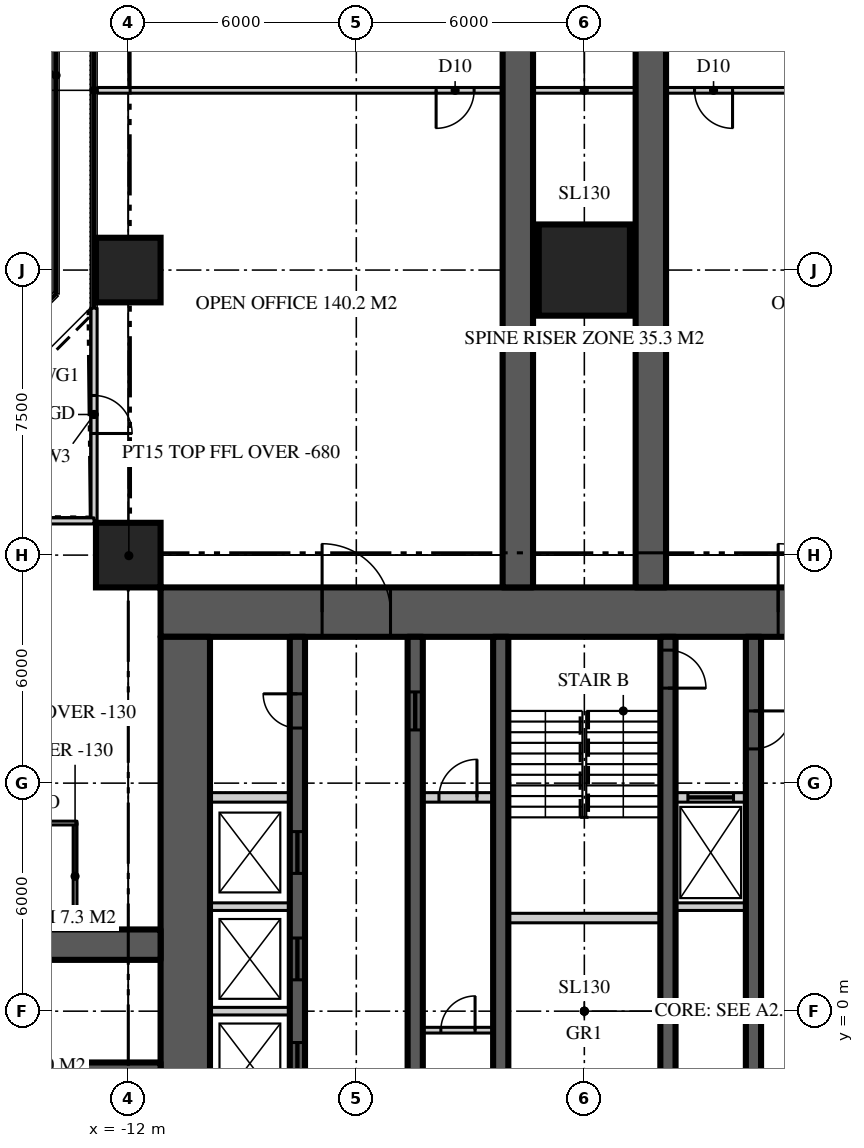
"""IFC4 building model, lengths in metres.
Left out: names, types, materials, properties, quantities, classifications, styles, units other than length and angle.
Written with IfcOpenShell. Run it as: python <this file> out.ifc"""

import sys

from ifc_helpers import new_model, si_unit, direction, frame, frame_2d, origin, origin_2d, place, context, subcontext, project, spatial, rectangle, extrude, element, fill, save


model = new_model("IFC4")
c1 = context("Model", 3, precision=1e-05, world=origin(), true_north=direction((0.0, 1.0)))
c2 = subcontext(c1, "Body", "Model", "MODEL_VIEW")
j1 = project(units=[si_unit("LENGTHUNIT", "METRE"), si_unit("PLANEANGLEUNIT", "RADIAN")], contexts=[c1])
p1 = place(None, origin())
s1 = spatial("IfcSite", under=j1, at=p1, CompositionType="ELEMENT")
p2 = place(p1, origin())
s2 = spatial("IfcBuilding", under=s1, at=p2, CompositionType="ELEMENT")
p3 = place(p2, frame((0.0, 0.0, 98.1)))
s3 = spatial("IfcBuildingStorey", under=s2, at=p3, CompositionType="ELEMENT", Elevation=98.1)
p4 = place(p3, frame((-11.15, 10.5, 0.0), z_axis=(0.0, 0.0, 1.0), x_axis=(1.0, 0.0, 0.0)))
e1 = element("IfcWall", 1, at=p4, inside=s3, PredefinedType="SHEAR", context=c2, shape_type="SweptSolid", body=[
    extrude(rectangle(XDim=22.3, YDim=1.3, at=frame_2d((11.15, 0.0))), origin(), (0.0, 0.0, 1.0), 3.9),
])
p5 = place(p4, frame((4.25, 0.0, 0.0)))
e2 = element("IfcOpeningElement", 2, at=p5, cuts=e1, PredefinedType="OPENING", context=c2, shape_type="SweptSolid", body=[
    extrude(rectangle(XDim=1.8, YDim=2.2, at=frame_2d((0.9, 1.1))), frame((0.0, 0.66, 0.0), z_axis=(0.0, -1.0, 0.0), x_axis=(1.0, 0.0, 0.0)), (0.0, 0.0, 1.0), 1.32),
])
p6 = place(p4, frame((16.25, 0.0, 0.0)))
e3 = element("IfcOpeningElement", 3, at=p6, cuts=e1, PredefinedType="OPENING", context=c2, shape_type="SweptSolid", body=[
    extrude(rectangle(XDim=1.8, YDim=2.2, at=frame_2d((0.9, 1.1))), frame((0.0, 0.66, 0.0), z_axis=(0.0, -1.0, 0.0), x_axis=(1.0, 0.0, 0.0)), (0.0, 0.0, 1.0), 1.32),
])
p7 = place(p3, frame((-10.5, 9.85, 0.0), z_axis=(0.0, 0.0, 1.0), x_axis=(0.0, -1.0, 0.0)))
e4 = element("IfcWall", 4, at=p7, inside=s3, PredefinedType="SHEAR", context=c2, shape_type="SweptSolid", body=[
    extrude(rectangle(XDim=19.7, YDim=1.3, at=frame_2d((9.85, 0.0))), origin(), (0.0, 0.0, 1.0), 3.9),
])
p8 = place(p7, frame((17.25, 0.0, 0.0)))
e5 = element("IfcOpeningElement", 5, at=p8, cuts=e4, PredefinedType="OPENING", context=c2, shape_type="SweptSolid", body=[
    extrude(rectangle(XDim=1.0, YDim=2.2, at=frame_2d((0.5, 1.1))), frame((0.0, 0.66, 0.0), z_axis=(0.0, -1.0, 0.0), x_axis=(1.0, 0.0, 0.0)), (0.0, 0.0, 1.0), 1.32),
])
for number, where, z_axis, x_axis in (
    (6, (1.75, 11.15, 0.0), (0.0, 0.0, 1.0), (0.0, 1.0, 0.0)),
    (7, (-1.75, 11.15, 0.0), (0.0, 0.0, 1.0), (0.0, 1.0, 0.0)),
    (8, (-11.15, 1.75, 0.0), (0.0, 0.0, 1.0), (-1.0, 0.0, 0.0)),
    (9, (-11.15, -1.75, 0.0), (0.0, 0.0, 1.0), (-1.0, 0.0, 0.0)),
):
    element("IfcWall", number, at=place(p3, frame(where, z_axis=z_axis, x_axis=x_axis)), inside=s3, PredefinedType="SHEAR", context=c2, shape_type="SweptSolid", body=[
        extrude(rectangle(XDim=15.25, YDim=0.8, at=frame_2d((7.625, 0.0))), origin(), (0.0, 0.0, 1.0), 3.9),
    ])
for number, where, z_axis, x_axis in (
    (10, (-12.0, 12.0, 0.0), (0.0, 0.0, 1.0), (1.0, 0.0, 0.0)),
    (11, (-12.0, 19.5, 0.0), (0.0, 0.0, 1.0), (1.0, 0.0, 0.0)),
):
    element("IfcColumn", number, at=place(p3, frame(where, z_axis=z_axis, x_axis=x_axis)), inside=s3, PredefinedType="COLUMN", context=c2, shape_type="SweptSolid", body=[
        extrude(rectangle(XDim=1.7, YDim=1.7, at=origin_2d()), origin(), (0.0, 0.0, 1.0), 3.9),
    ])
p9 = place(p3, frame((0.0, 19.5, 0.0), z_axis=(0.0, 0.0, 1.0), x_axis=(1.0, 0.0, 0.0)))
e12 = element("IfcColumn", 12, at=p9, inside=s3, PredefinedType="COLUMN", context=c2, shape_type="SweptSolid", body=[
    extrude(rectangle(XDim=2.4, YDim=2.4, at=origin_2d()), origin(), (0.0, 0.0, 1.0), 3.9),
])
p10 = place(p3, frame((-12.9, 18.5, 0.0), z_axis=(0.0, 0.0, 1.0), x_axis=(0.0, -1.0, 0.0)))
e13 = element("IfcWall", 13, at=p10, inside=s3, PredefinedType="SOLIDWALL", context=c2, shape_type="SweptSolid", body=[
    extrude(rectangle(XDim=5.6, YDim=0.16, at=frame_2d((2.8, 0.0))), origin(), (0.0, 0.0, 1.0), 3.77),
])
p11 = place(p10, frame((2.3, 0.0, 0.0)))
e14 = element("IfcOpeningElement", 14, at=p11, cuts=e13, PredefinedType="OPENING", context=c2, shape_type="SweptSolid", body=[
    extrude(rectangle(XDim=1.0, YDim=2.2, at=frame_2d((0.5, 1.1))), frame((0.0, 0.09, 0.0), z_axis=(0.0, -1.0, 0.0), x_axis=(1.0, 0.0, 0.0)), (0.0, 0.0, 1.0), 0.18),
])
p12 = place(p3, frame((-12.9, 12.9, 0.0), z_axis=(0.0, 0.0, 1.0), x_axis=(-1.0, 0.0, 0.0)))
e15 = element("IfcWall", 15, at=p12, inside=s3, PredefinedType="SOLIDWALL", context=c2, shape_type="SweptSolid", body=[
    extrude(rectangle(XDim=5.6, YDim=0.16, at=frame_2d((2.8, 0.0))), origin(), (0.0, 0.0, 1.0), 3.77),
])
p13 = place(p3, frame((-7.55, -9.85, 0.0), z_axis=(0.0, 0.0, 1.0), x_axis=(0.0, 1.0, 0.0)))
e16 = element("IfcWall", 16, at=p13, inside=s3, PredefinedType="SHEAR", context=c2, shape_type="SweptSolid", body=[
    extrude(rectangle(XDim=19.7, YDim=0.4, at=frame_2d((9.85, 0.0))), origin(), (0.0, 0.0, 1.0), 3.9),
])
p14 = place(p13, frame((1.45, 0.0, 0.0)))
e17 = element("IfcOpeningElement", 17, at=p14, cuts=e16, PredefinedType="OPENING", context=c2, shape_type="SweptSolid", body=[
    extrude(rectangle(XDim=1.0, YDim=2.2, at=frame_2d((0.5, 1.1))), frame((0.0, 0.21, 0.0), z_axis=(0.0, -1.0, 0.0), x_axis=(1.0, 0.0, 0.0)), (0.0, 0.0, 1.0), 0.42),
])
p15 = place(p13, frame((17.3, 0.0, 0.0)))
e18 = element("IfcOpeningElement", 18, at=p15, cuts=e16, PredefinedType="OPENING", context=c2, shape_type="SweptSolid", body=[
    extrude(rectangle(XDim=0.9, YDim=2.1, at=frame_2d((0.45, 1.05))), frame((0.0, 0.21, 0.0), z_axis=(0.0, -1.0, 0.0), x_axis=(1.0, 0.0, 0.0)), (0.0, 0.0, 1.0), 0.42),
])
p16 = place(p13, frame((5.125, 0.0, 0.0)))
e19 = element("IfcOpeningElement", 19, at=p16, cuts=e16, PredefinedType="OPENING", context=c2, shape_type="SweptSolid", body=[
    extrude(rectangle(XDim=1.1, YDim=2.2, at=frame_2d((0.55, 1.1))), frame((0.0, 0.21, 0.0), z_axis=(0.0, -1.0, 0.0), x_axis=(1.0, 0.0, 0.0)), (0.0, 0.0, 1.0), 0.42),
])
p17 = place(p13, frame((7.925, 0.0, 0.0)))
e20 = element("IfcOpeningElement", 20, at=p17, cuts=e16, PredefinedType="OPENING", context=c2, shape_type="SweptSolid", body=[
    extrude(rectangle(XDim=1.1, YDim=2.2, at=frame_2d((0.55, 1.1))), frame((0.0, 0.21, 0.0), z_axis=(0.0, -1.0, 0.0), x_axis=(1.0, 0.0, 0.0)), (0.0, 0.0, 1.0), 0.42),
])
p18 = place(p13, frame((10.675, 0.0, 0.0)))
e21 = element("IfcOpeningElement", 21, at=p18, cuts=e16, PredefinedType="OPENING", context=c2, shape_type="SweptSolid", body=[
    extrude(rectangle(XDim=1.1, YDim=2.2, at=frame_2d((0.55, 1.1))), frame((0.0, 0.21, 0.0), z_axis=(0.0, -1.0, 0.0), x_axis=(1.0, 0.0, 0.0)), (0.0, 0.0, 1.0), 0.42),
])
p19 = place(p13, frame((13.475, 0.0, 0.0)))
e22 = element("IfcOpeningElement", 22, at=p19, cuts=e16, PredefinedType="OPENING", context=c2, shape_type="SweptSolid", body=[
    extrude(rectangle(XDim=1.1, YDim=2.2, at=frame_2d((0.55, 1.1))), frame((0.0, 0.21, 0.0), z_axis=(0.0, -1.0, 0.0), x_axis=(1.0, 0.0, 0.0)), (0.0, 0.0, 1.0), 0.42),
])
p20 = place(p3, frame((-4.45, -9.85, 0.0), z_axis=(0.0, 0.0, 1.0), x_axis=(0.0, 1.0, 0.0)))
e23 = element("IfcWall", 23, at=p20, inside=s3, PredefinedType="SHEAR", context=c2, shape_type="SweptSolid", body=[
    extrude(rectangle(XDim=19.7, YDim=0.4, at=frame_2d((9.85, 0.0))), origin(), (0.0, 0.0, 1.0), 3.9),
])
p21 = place(p20, frame((1.95, 0.0, 0.0)))
e24 = element("IfcOpeningElement", 24, at=p21, cuts=e23, PredefinedType="OPENING", context=c2, shape_type="SweptSolid", body=[
    extrude(rectangle(XDim=1.0, YDim=2.2, at=frame_2d((0.5, 1.1))), frame((0.0, 0.21, 0.0), z_axis=(0.0, -1.0, 0.0), x_axis=(1.0, 0.0, 0.0)), (0.0, 0.0, 1.0), 0.42),
])
p22 = place(p20, frame((17.25, 0.0, 0.0)))
e25 = element("IfcOpeningElement", 25, at=p22, cuts=e23, PredefinedType="OPENING", context=c2, shape_type="SweptSolid", body=[
    extrude(rectangle(XDim=1.0, YDim=2.1, at=frame_2d((0.5, 1.05))), frame((0.0, 0.21, 0.0), z_axis=(0.0, -1.0, 0.0), x_axis=(1.0, 0.0, 0.0)), (0.0, 0.0, 1.0), 0.42),
])
p23 = place(p3, frame((4.45, 9.85, 0.0), z_axis=(0.0, 0.0, 1.0), x_axis=(0.0, -1.0, 0.0)))
e26 = element("IfcWall", 26, at=p23, inside=s3, PredefinedType="SHEAR", context=c2, shape_type="SweptSolid", body=[
    extrude(rectangle(XDim=19.7, YDim=0.4, at=frame_2d((9.85, 0.0))), origin(), (0.0, 0.0, 1.0), 3.9),
])
p24 = place(p23, frame((1.95, 0.0, 0.0)))
e27 = element("IfcOpeningElement", 27, at=p24, cuts=e26, PredefinedType="OPENING", context=c2, shape_type="SweptSolid", body=[
    extrude(rectangle(XDim=1.0, YDim=2.2, at=frame_2d((0.5, 1.1))), frame((0.0, 0.21, 0.0), z_axis=(0.0, -1.0, 0.0), x_axis=(1.0, 0.0, 0.0)), (0.0, 0.0, 1.0), 0.42),
])
p25 = place(p23, frame((17.3, 0.0, 0.0)))
e28 = element("IfcOpeningElement", 28, at=p25, cuts=e26, PredefinedType="OPENING", context=c2, shape_type="SweptSolid", body=[
    extrude(rectangle(XDim=0.9, YDim=2.1, at=frame_2d((0.45, 1.05))), frame((0.0, 0.21, 0.0), z_axis=(0.0, -1.0, 0.0), x_axis=(1.0, 0.0, 0.0)), (0.0, 0.0, 1.0), 0.42),
])
p26 = place(p3, frame((-2.2, -9.85, 0.0), z_axis=(0.0, 0.0, 1.0), x_axis=(0.0, 1.0, 0.0)))
e29 = element("IfcWall", 29, at=p26, inside=s3, PredefinedType="SHEAR", context=c2, shape_type="SweptSolid", body=[
    extrude(rectangle(XDim=19.7, YDim=0.4, at=frame_2d((9.85, 0.0))), origin(), (0.0, 0.0, 1.0), 3.9),
])
p27 = place(p26, frame((0.35, 0.0, 0.0)))
e30 = element("IfcOpeningElement", 30, at=p27, cuts=e29, PredefinedType="OPENING", context=c2, shape_type="SweptSolid", body=[
    extrude(rectangle(XDim=1.0, YDim=2.2, at=frame_2d((0.5, 1.1))), frame((0.0, 0.21, 0.0), z_axis=(0.0, -1.0, 0.0), x_axis=(1.0, 0.0, 0.0)), (0.0, 0.0, 1.0), 0.42),
])
p28 = place(p3, frame((2.2, 9.85, 0.0), z_axis=(0.0, 0.0, 1.0), x_axis=(0.0, -1.0, 0.0)))
e31 = element("IfcWall", 31, at=p28, inside=s3, PredefinedType="SHEAR", context=c2, shape_type="SweptSolid", body=[
    extrude(rectangle(XDim=19.7, YDim=0.4, at=frame_2d((9.85, 0.0))), origin(), (0.0, 0.0, 1.0), 3.9),
])
p29 = place(p28, frame((0.35, 0.0, 0.0)))
e32 = element("IfcOpeningElement", 32, at=p29, cuts=e31, PredefinedType="OPENING", context=c2, shape_type="SweptSolid", body=[
    extrude(rectangle(XDim=1.0, YDim=2.2, at=frame_2d((0.5, 1.1))), frame((0.0, 0.21, 0.0), z_axis=(0.0, -1.0, 0.0), x_axis=(1.0, 0.0, 0.0)), (0.0, 0.0, 1.0), 0.42),
])
p30 = place(p3, frame((-9.85, 5.625, 0.0), z_axis=(0.0, 0.0, 1.0), x_axis=(1.0, 0.0, 0.0)))
e33 = element("IfcWall", 33, at=p30, inside=s3, PredefinedType="SOLIDWALL", context=c2, shape_type="SweptSolid", body=[
    extrude(rectangle(XDim=2.1, YDim=0.25, at=frame_2d((1.05, 0.0))), origin(), (0.0, 0.0, 1.0), 3.7),
])
p31 = place(p3, frame((-4.25, 5.625, 0.0), z_axis=(0.0, 0.0, 1.0), x_axis=(1.0, 0.0, 0.0)))
e34 = element("IfcWall", 34, at=p31, inside=s3, PredefinedType="SOLIDWALL", context=c2, shape_type="SweptSolid", body=[
    extrude(rectangle(XDim=1.85, YDim=0.25, at=frame_2d((0.925, 0.0))), origin(), (0.0, 0.0, 1.0), 3.7),
])
p32 = place(p31, frame((0.425, 0.0, 0.0)))
e35 = element("IfcOpeningElement", 35, at=p32, cuts=e34, PredefinedType="OPENING", context=c2, shape_type="SweptSolid", body=[
    extrude(rectangle(XDim=1.0, YDim=2.2, at=frame_2d((0.5, 1.1))), frame((0.0, 0.135, 0.0), z_axis=(0.0, -1.0, 0.0), x_axis=(1.0, 0.0, 0.0)), (0.0, 0.0, 1.0), 0.27),
])
p33 = place(p3, frame((2.4, 5.625, 0.0), z_axis=(0.0, 0.0, 1.0), x_axis=(1.0, 0.0, 0.0)))
e36 = element("IfcWall", 36, at=p33, inside=s3, PredefinedType="SOLIDWALL", context=c2, shape_type="SweptSolid", body=[
    extrude(rectangle(XDim=1.85, YDim=0.25, at=frame_2d((0.925, 0.0))), origin(), (0.0, 0.0, 1.0), 3.7),
])
p34 = place(p33, frame((0.325, 0.0, 0.0)))
e37 = element("IfcOpeningElement", 37, at=p34, cuts=e36, PredefinedType="OPENING", context=c2, shape_type="SweptSolid", body=[
    extrude(rectangle(XDim=1.2, YDim=2.2, at=frame_2d((0.6, 1.1))), frame((0.0, 0.135, 0.0), z_axis=(0.0, -1.0, 0.0), x_axis=(1.0, 0.0, 0.0)), (0.0, 0.0, 1.0), 0.27),
])
p35 = place(p3, frame((-2.0, 2.45, 0.0), z_axis=(0.0, 0.0, 1.0), x_axis=(1.0, 0.0, 0.0)))
e38 = element("IfcWall", 38, at=p35, inside=s3, PredefinedType="SOLIDWALL", context=c2, shape_type="SweptSolid", body=[
    extrude(rectangle(XDim=4.0, YDim=0.25, at=frame_2d((2.0, 0.0))), origin(), (0.0, 0.0, 1.0), 3.7),
])
for number, where, z_axis, x_axis in (
    (39, (-9.85, 0.0, 0.0), (0.0, 0.0, 1.0), (1.0, 0.0, 0.0)),
    (40, (-9.85, 2.75, 0.0), (0.0, 0.0, 1.0), (1.0, 0.0, 0.0)),
):
    element("IfcWall", number, at=place(p3, frame(where, z_axis=z_axis, x_axis=x_axis)), inside=s3, PredefinedType="SOLIDWALL", context=c2, shape_type="SweptSolid", body=[
        extrude(rectangle(XDim=2.1, YDim=0.2, at=frame_2d((1.05, 0.0))), origin(), (0.0, 0.0, 1.0), 3.7),
    ])
p36 = place(p3, frame((2.4, 2.75, 0.0), z_axis=(0.0, 0.0, 1.0), x_axis=(1.0, 0.0, 0.0)))
e41 = element("IfcWall", 41, at=p36, inside=s3, PredefinedType="SOLIDWALL", context=c2, shape_type="SweptSolid", body=[
    extrude(rectangle(XDim=1.85, YDim=0.2, at=frame_2d((0.925, 0.0))), origin(), (0.0, 0.0, 1.0), 3.7),
])
p37 = place(p3, frame((12.82, 24.229, 0.0), z_axis=(0.0, 0.0, 1.0), x_axis=(-1.0, 0.0, 0.0)))
e42 = element("IfcWall", 42, at=p37, inside=s3, PredefinedType="PARTITIONING", context=c2, shape_type="SweptSolid", body=[
    extrude(rectangle(XDim=25.64, YDim=0.15, at=frame_2d((12.82, 0.0))), origin(), (0.0, 0.0, 1.0), 3.77),
])
p38 = place(p37, frame((15.72, 0.0, 0.0)))
e43 = element("IfcOpeningElement", 43, at=p38, cuts=e42, PredefinedType="OPENING", context=c2, shape_type="SweptSolid", body=[
    extrude(rectangle(XDim=1.0, YDim=2.2, at=frame_2d((0.5, 1.1))), frame((0.0, 0.085, 0.0), z_axis=(0.0, -1.0, 0.0), x_axis=(1.0, 0.0, 0.0)), (0.0, 0.0, 1.0), 0.17),
])
p39 = place(p37, frame((8.92, 0.0, 0.0)))
e44 = element("IfcOpeningElement", 44, at=p39, cuts=e42, PredefinedType="OPENING", context=c2, shape_type="SweptSolid", body=[
    extrude(rectangle(XDim=1.0, YDim=2.2, at=frame_2d((0.5, 1.1))), frame((0.0, 0.085, 0.0), z_axis=(0.0, -1.0, 0.0), x_axis=(1.0, 0.0, 0.0)), (0.0, 0.0, 1.0), 0.17),
])
p40 = place(p3, frame((-13.4, 2.15, 0.0), z_axis=(0.0, 0.0, 1.0), x_axis=(0.0, 1.0, 0.0)))
e45 = element("IfcWall", 45, at=p40, inside=s3, PredefinedType="PARTITIONING", context=c2, shape_type="SweptSolid", body=[
    extrude(rectangle(XDim=2.8, YDim=0.1, at=frame_2d((1.4, 0.0))), origin(), (0.0, 0.0, 1.0), 3.77),
])
p41 = place(p3, frame((-13.35, 4.95, 0.0), z_axis=(0.0, 0.0, 1.0), x_axis=(-1.0, 0.0, 0.0)))
e46 = element("IfcWall", 46, at=p41, inside=s3, PredefinedType="PARTITIONING", context=c2, shape_type="SweptSolid", body=[
    extrude(rectangle(XDim=2.7, YDim=0.1, at=frame_2d((1.35, 0.0))), origin(), (0.0, 0.0, 1.0), 3.77),
])
p42 = place(p41, frame((0.85, 0.0, 0.0)))
e47 = element("IfcOpeningElement", 47, at=p42, cuts=e46, PredefinedType="OPENING", context=c2, shape_type="SweptSolid", body=[
    extrude(rectangle(XDim=1.0, YDim=2.2, at=frame_2d((0.5, 1.1))), frame((0.0, 0.06, 0.0), z_axis=(0.0, -1.0, 0.0), x_axis=(1.0, 0.0, 0.0)), (0.0, 0.0, 1.0), 0.12),
])
p43 = place(p3, frame((-11.15, 11.15, 0.0), z_axis=(0.0, 0.0, 1.0), x_axis=(-0.707106781187, 0.707106781187, 0.0)))
e48 = element("IfcWall", 48, at=p43, inside=s3, PredefinedType="PARTITIONING", context=c2, shape_type="SweptSolid", body=[
    extrude(rectangle(XDim=2.362, YDim=0.15, at=frame_2d((1.181, 0.0))), origin(), (0.0, 0.0, 1.0), 3.22),
])
p44 = place(p3, frame((-4.25, -0.5, 0.0), z_axis=(0.0, 0.0, 1.0), x_axis=(1.0, 0.0, 0.0)))
e49 = element("IfcWall", 49, at=p44, inside=s3, PredefinedType="SOLIDWALL", context=c2, shape_type="SweptSolid", body=[
    extrude(rectangle(XDim=1.85, YDim=0.15, at=frame_2d((0.925, 0.0))), origin(), (0.0, 0.0, 1.0), 3.77),
])
p45 = place(p44, frame((0.475, 0.0, 0.0)))
e50 = element("IfcOpeningElement", 50, at=p45, cuts=e49, PredefinedType="OPENING", context=c2, shape_type="SweptSolid", body=[
    extrude(rectangle(XDim=0.9, YDim=2.1, at=frame_2d((0.45, 1.05))), frame((0.0, 0.085, 0.0), z_axis=(0.0, -1.0, 0.0), x_axis=(1.0, 0.0, 0.0)), (0.0, 0.0, 1.0), 0.17),
])
p46 = place(p11, origin())
e51 = element("IfcDoor", 51, at=p46, inside=s3, OperationType="SINGLE_SWING_RIGHT", PredefinedType="DOOR", context=c2, shape_type="SweptSolid", body=[
    extrude(rectangle(XDim=1.0, YDim=2.2, at=frame_2d((0.5, 1.1))), frame((0.0, 0.025, 0.0), z_axis=(0.0, -1.0, 0.0), x_axis=(1.0, 0.0, 0.0)), (0.0, 0.0, 1.0), 0.05),
])
fill(e14, e51)
p47 = place(p5, origin())
e52 = element("IfcDoor", 52, at=p47, inside=s3, OperationType="DOUBLE_DOOR_DOUBLE_SWING", PredefinedType="DOOR", context=c2, shape_type="SweptSolid", body=[
    extrude(rectangle(XDim=1.8, YDim=2.2, at=frame_2d((0.9, 1.1))), frame((0.0, 0.025, 0.0), z_axis=(0.0, -1.0, 0.0), x_axis=(1.0, 0.0, 0.0)), (0.0, 0.0, 1.0), 0.05),
])
fill(e2, e52)
p48 = place(p6, origin())
e53 = element("IfcDoor", 53, at=p48, inside=s3, OperationType="DOUBLE_DOOR_DOUBLE_SWING", PredefinedType="DOOR", context=c2, shape_type="SweptSolid", body=[
    extrude(rectangle(XDim=1.8, YDim=2.2, at=frame_2d((0.9, 1.1))), frame((0.0, 0.025, 0.0), z_axis=(0.0, -1.0, 0.0), x_axis=(1.0, 0.0, 0.0)), (0.0, 0.0, 1.0), 0.05),
])
fill(e3, e53)
p49 = place(p24, origin())
e54 = element("IfcDoor", 54, at=p49, inside=s3, OperationType="SINGLE_SWING_LEFT", PredefinedType="DOOR", context=c2, shape_type="SweptSolid", body=[
    extrude(rectangle(XDim=1.0, YDim=2.2, at=frame_2d((0.5, 1.1))), frame((0.0, 0.025, 0.0), z_axis=(0.0, -1.0, 0.0), x_axis=(1.0, 0.0, 0.0)), (0.0, 0.0, 1.0), 0.05),
])
fill(e27, e54)
p50 = place(p29, origin())
e55 = element("IfcDoor", 55, at=p50, inside=s3, OperationType="SINGLE_SWING_RIGHT", PredefinedType="DOOR", context=c2, shape_type="SweptSolid", body=[
    extrude(rectangle(XDim=1.0, YDim=2.2, at=frame_2d((0.5, 1.1))), frame((0.0, 0.025, 0.0), z_axis=(0.0, -1.0, 0.0), x_axis=(1.0, 0.0, 0.0)), (0.0, 0.0, 1.0), 0.05),
])
fill(e32, e55)
p51 = place(p15, origin())
e56 = element("IfcDoor", 56, at=p51, inside=s3, OperationType="SINGLE_SWING_RIGHT", PredefinedType="DOOR", context=c2, shape_type="SweptSolid", body=[
    extrude(rectangle(XDim=0.9, YDim=2.1, at=frame_2d((0.45, 1.05))), frame((0.0, 0.025, 0.0), z_axis=(0.0, -1.0, 0.0), x_axis=(1.0, 0.0, 0.0)), (0.0, 0.0, 1.0), 0.05),
])
fill(e18, e56)
p52 = place(p22, origin())
e57 = element("IfcDoor", 57, at=p52, inside=s3, OperationType="SLIDING_TO_LEFT", PredefinedType="DOOR", context=c2, shape_type="SweptSolid", body=[
    extrude(rectangle(XDim=1.0, YDim=2.1, at=frame_2d((0.5, 1.05))), frame((0.0, 0.025, 0.0), z_axis=(0.0, -1.0, 0.0), x_axis=(1.0, 0.0, 0.0)), (0.0, 0.0, 1.0), 0.05),
])
fill(e25, e57)
p53 = place(p17, origin())
e58 = element("IfcDoor", 58, at=p53, inside=s3, OperationType="SLIDING_TO_LEFT", PredefinedType="DOOR", context=c2, shape_type="SweptSolid", body=[
    extrude(rectangle(XDim=1.1, YDim=2.2, at=frame_2d((0.55, 1.1))), frame((0.0, 0.025, 0.0), z_axis=(0.0, -1.0, 0.0), x_axis=(1.0, 0.0, 0.0)), (0.0, 0.0, 1.0), 0.05),
])
fill(e20, e58)
p54 = place(p18, origin())
e59 = element("IfcDoor", 59, at=p54, inside=s3, OperationType="SLIDING_TO_LEFT", PredefinedType="DOOR", context=c2, shape_type="SweptSolid", body=[
    extrude(rectangle(XDim=1.1, YDim=2.2, at=frame_2d((0.55, 1.1))), frame((0.0, 0.025, 0.0), z_axis=(0.0, -1.0, 0.0), x_axis=(1.0, 0.0, 0.0)), (0.0, 0.0, 1.0), 0.05),
])
fill(e21, e59)
p55 = place(p19, origin())
e60 = element("IfcDoor", 60, at=p55, inside=s3, OperationType="SLIDING_TO_LEFT", PredefinedType="DOOR", context=c2, shape_type="SweptSolid", body=[
    extrude(rectangle(XDim=1.1, YDim=2.2, at=frame_2d((0.55, 1.1))), frame((0.0, 0.025, 0.0), z_axis=(0.0, -1.0, 0.0), x_axis=(1.0, 0.0, 0.0)), (0.0, 0.0, 1.0), 0.05),
])
fill(e22, e60)
p56 = place(p34, origin())
e61 = element("IfcDoor", 61, at=p56, inside=s3, OperationType="SLIDING_TO_LEFT", PredefinedType="DOOR", context=c2, shape_type="SweptSolid", body=[
    extrude(rectangle(XDim=1.2, YDim=2.2, at=frame_2d((0.6, 1.1))), frame((0.0, 0.025, 0.0), z_axis=(0.0, -1.0, 0.0), x_axis=(1.0, 0.0, 0.0)), (0.0, 0.0, 1.0), 0.05),
])
fill(e37, e61)
p57 = place(p38, origin())
e62 = element("IfcDoor", 62, at=p57, inside=s3, OperationType="SINGLE_SWING_RIGHT", PredefinedType="DOOR", context=c2, shape_type="SweptSolid", body=[
    extrude(rectangle(XDim=1.0, YDim=2.2, at=frame_2d((0.5, 1.1))), frame((0.0, 0.025, 0.0), z_axis=(0.0, -1.0, 0.0), x_axis=(1.0, 0.0, 0.0)), (0.0, 0.0, 1.0), 0.05),
])
fill(e43, e62)
p58 = place(p39, origin())
e63 = element("IfcDoor", 63, at=p58, inside=s3, OperationType="SINGLE_SWING_LEFT", PredefinedType="DOOR", context=c2, shape_type="SweptSolid", body=[
    extrude(rectangle(XDim=1.0, YDim=2.2, at=frame_2d((0.5, 1.1))), frame((0.0, 0.025, 0.0), z_axis=(0.0, -1.0, 0.0), x_axis=(1.0, 0.0, 0.0)), (0.0, 0.0, 1.0), 0.05),
])
fill(e44, e63)
p59 = place(p45, origin())
e64 = element("IfcDoor", 64, at=p59, inside=s3, OperationType="SINGLE_SWING_RIGHT", PredefinedType="DOOR", context=c2, shape_type="SweptSolid", body=[
    extrude(rectangle(XDim=0.9, YDim=2.1, at=frame_2d((0.45, 1.05))), frame((0.0, 0.025, 0.0), z_axis=(0.0, -1.0, 0.0), x_axis=(1.0, 0.0, 0.0)), (0.0, 0.0, 1.0), 0.05),
])
fill(e50, e64)
p60 = place(p32, origin())
e65 = element("IfcDoor", 65, at=p60, inside=s3, OperationType="SINGLE_SWING_RIGHT", PredefinedType="DOOR", context=c2, shape_type="SweptSolid", body=[
    extrude(rectangle(XDim=1.0, YDim=2.2, at=frame_2d((0.5, 1.1))), frame((0.0, 0.025, 0.0), z_axis=(0.0, -1.0, 0.0), x_axis=(1.0, 0.0, 0.0)), (0.0, 0.0, 1.0), 0.05),
])
fill(e35, e65)
save(model, sys.argv[1])
